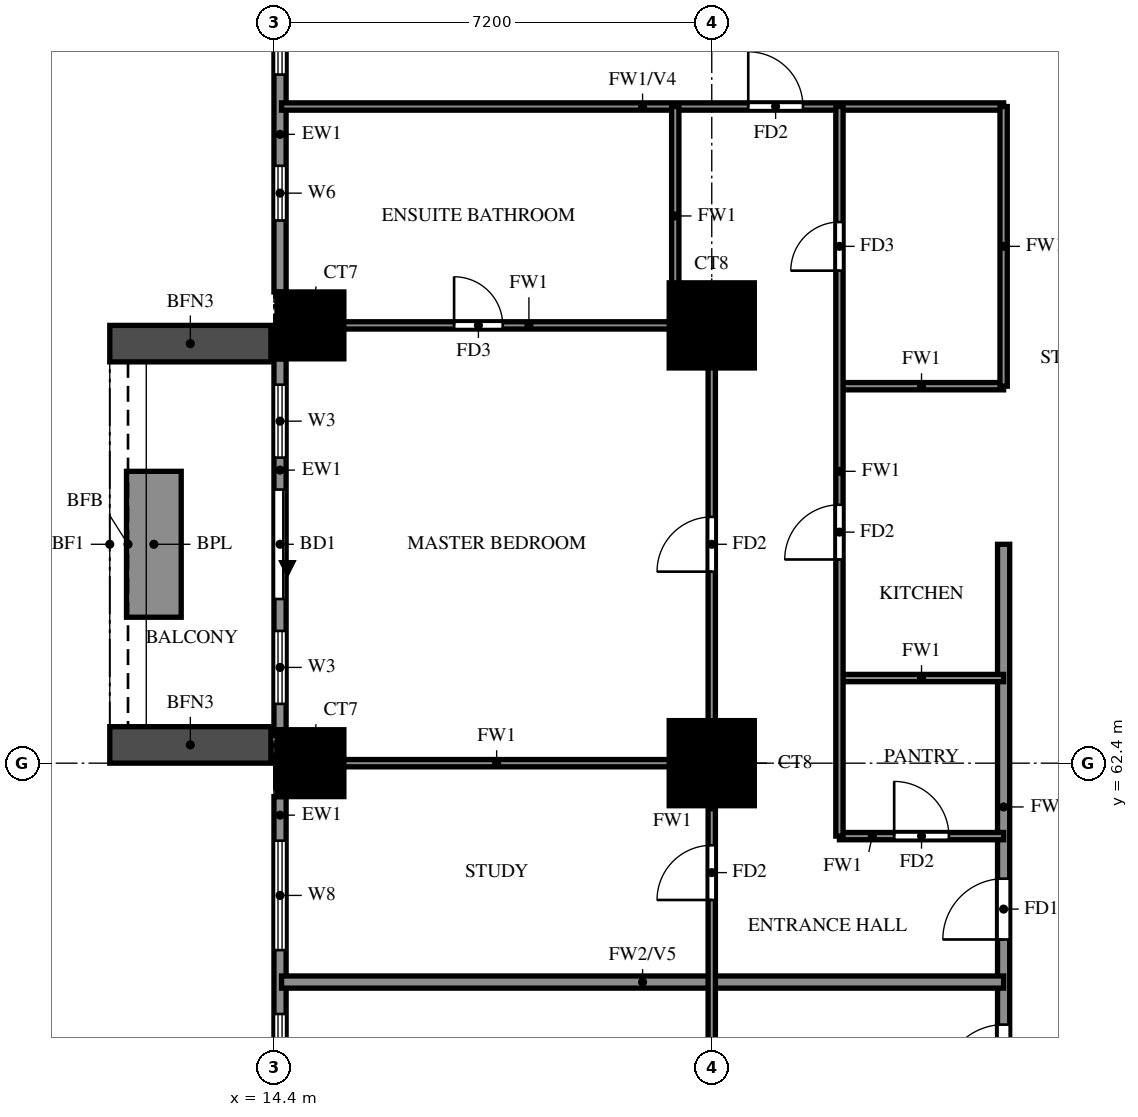
"""IFC4 building model, lengths in metres.
Left out: names, types, materials, properties, quantities, classifications, styles, units other than length and angle.
Written with IfcOpenShell. Run it as: python <this file> out.ifc"""

import sys

from ifc_helpers import new_model, si_unit, direction, frame, frame_2d, origin, origin_2d, place, context, subcontext, project, spatial, rectangle, extrude, source, transform, mapped, element, fill, save


model = new_model("IFC4")
c1 = context("Model", 3, precision=1e-05, world=origin(), true_north=direction((0.0, 1.0)))
c2 = subcontext(c1, "Body", "Model", "MODEL_VIEW")
j1 = project(units=[si_unit("LENGTHUNIT", "METRE"), si_unit("PLANEANGLEUNIT", "RADIAN")], contexts=[c1])
p1 = place(None, origin())
s1 = spatial("IfcSite", under=j1, at=p1, CompositionType="ELEMENT")
p2 = place(p1, origin())
s2 = spatial("IfcBuilding", under=s1, at=p2, CompositionType="ELEMENT")
p3 = place(p2, frame((0.0, 0.0, 58.5)))
s3 = spatial("IfcBuildingStorey", under=s2, at=p3, CompositionType="ELEMENT", Elevation=58.5)
m1 = source(origin(), c2, "Body", "SweptSolid", [
    extrude(rectangle(XDim=1.1, YDim=1.1, at=origin_2d()), origin(), (0.0, 0.0, 1.0), 3.18),
])
p4 = place(p3, frame((15.0, 62.4, 0.0), z_axis=(0.0, 0.0, 1.0), x_axis=(1.0, 0.0, 0.0)))
e1 = element("IfcColumn", 1, at=p4, inside=s3, PredefinedType="COLUMN", context=c2, shape_type="MappedRepresentation", body=[
    mapped(m1, transform((0.0, 0.0, 0.0))),
])
m2 = source(origin(), c2, "Body", "SweptSolid", [
    extrude(rectangle(XDim=1.4, YDim=1.4, at=origin_2d()), origin(), (0.0, 0.0, 1.0), 3.18),
])
p5 = place(p3, frame((21.6, 62.4, 0.0), z_axis=(0.0, 0.0, 1.0), x_axis=(1.0, 0.0, 0.0)))
e2 = element("IfcColumn", 2, at=p5, inside=s3, PredefinedType="COLUMN", context=c2, shape_type="MappedRepresentation", body=[
    mapped(m2, transform((0.0, 0.0, 0.0))),
])
p6 = place(p3, frame((15.0, 69.6, 0.0), z_axis=(0.0, 0.0, 1.0), x_axis=(1.0, 0.0, 0.0)))
e3 = element("IfcColumn", 3, at=p6, inside=s3, PredefinedType="COLUMN", context=c2, shape_type="MappedRepresentation", body=[
    mapped(m1, transform((0.0, 0.0, 0.0))),
])
p7 = place(p3, frame((21.6, 69.6, 0.0), z_axis=(0.0, 0.0, 1.0), x_axis=(1.0, 0.0, 0.0)))
e4 = element("IfcColumn", 4, at=p7, inside=s3, PredefinedType="COLUMN", context=c2, shape_type="MappedRepresentation", body=[
    mapped(m2, transform((0.0, 0.0, 0.0))),
])
p8 = place(p3, frame((14.5, 76.25, 0.0), z_axis=(0.0, 0.0, 1.0), x_axis=(0.0, -1.0, 0.0)))
e5 = element("IfcWall", 5, at=p8, inside=s3, PredefinedType="SOLIDWALL", context=c2, shape_type="SweptSolid", body=[
    extrude(rectangle(XDim=6.1, YDim=0.2, at=frame_2d((3.05, 0.0))), origin(), (0.0, 0.0, 1.0), 3.18),
])
p9 = place(p8, frame((4.025, 0.0, 1.5)))
e6 = element("IfcOpeningElement", 6, at=p9, cuts=e5, PredefinedType="OPENING", context=c2, shape_type="SweptSolid", body=[
    extrude(rectangle(XDim=0.9, YDim=0.9, at=frame_2d((0.45, 0.45))), frame((0.0, 0.11, 0.0), z_axis=(0.0, -1.0, 0.0), x_axis=(1.0, 0.0, 0.0)), (0.0, 0.0, 1.0), 0.22),
])
p10 = place(p8, frame((0.725, 0.0, 0.6)))
e7 = element("IfcOpeningElement", 7, at=p10, cuts=e5, PredefinedType="OPENING", context=c2, shape_type="SweptSolid", body=[
    extrude(rectangle(XDim=1.8, YDim=2.4, at=frame_2d((0.9, 1.2))), frame((0.0, 0.11, 0.0), z_axis=(0.0, -1.0, 0.0), x_axis=(1.0, 0.0, 0.0)), (0.0, 0.0, 1.0), 0.22),
])
p11 = place(p3, frame((14.5, 69.05, 0.0), z_axis=(0.0, 0.0, 1.0), x_axis=(0.0, -1.0, 0.0)))
e8 = element("IfcWall", 8, at=p11, inside=s3, PredefinedType="SOLIDWALL", context=c2, shape_type="SweptSolid", body=[
    extrude(rectangle(XDim=6.1, YDim=0.2, at=frame_2d((3.05, 0.0))), origin(), (0.0, 0.0, 1.0), 3.18),
])
p12 = place(p11, frame((2.15, 0.0, 0.0)))
e9 = element("IfcOpeningElement", 9, at=p12, cuts=e8, PredefinedType="OPENING", context=c2, shape_type="SweptSolid", body=[
    extrude(rectangle(XDim=1.8, YDim=2.4, at=frame_2d((0.9, 1.2))), frame((0.0, 0.11, 0.0), z_axis=(0.0, -1.0, 0.0), x_axis=(1.0, 0.0, 0.0)), (0.0, 0.0, 1.0), 0.22),
])
p13 = place(p11, frame((0.425, 0.0, 0.6)))
e10 = element("IfcOpeningElement", 10, at=p13, cuts=e8, PredefinedType="OPENING", context=c2, shape_type="SweptSolid", body=[
    extrude(rectangle(XDim=1.2, YDim=2.4, at=frame_2d((0.6, 1.2))), frame((0.0, 0.11, 0.0), z_axis=(0.0, -1.0, 0.0), x_axis=(1.0, 0.0, 0.0)), (0.0, 0.0, 1.0), 0.22),
])
p14 = place(p11, frame((4.475, 0.0, 0.6)))
e11 = element("IfcOpeningElement", 11, at=p14, cuts=e8, PredefinedType="OPENING", context=c2, shape_type="SweptSolid", body=[
    extrude(rectangle(XDim=1.2, YDim=2.4, at=frame_2d((0.6, 1.2))), frame((0.0, 0.11, 0.0), z_axis=(0.0, -1.0, 0.0), x_axis=(1.0, 0.0, 0.0)), (0.0, 0.0, 1.0), 0.22),
])
p15 = place(p3, frame((14.5, 61.85, 0.0), z_axis=(0.0, 0.0, 1.0), x_axis=(0.0, -1.0, 0.0)))
e12 = element("IfcWall", 12, at=p15, inside=s3, PredefinedType="SOLIDWALL", context=c2, shape_type="SweptSolid", body=[
    extrude(rectangle(XDim=6.1, YDim=0.2, at=frame_2d((3.05, 0.0))), origin(), (0.0, 0.0, 1.0), 3.18),
])
p16 = place(p15, frame((3.575, 0.0, 0.6)))
e13 = element("IfcOpeningElement", 13, at=p16, cuts=e12, PredefinedType="OPENING", context=c2, shape_type="SweptSolid", body=[
    extrude(rectangle(XDim=1.8, YDim=2.4, at=frame_2d((0.9, 1.2))), frame((0.0, 0.11, 0.0), z_axis=(0.0, -1.0, 0.0), x_axis=(1.0, 0.0, 0.0)), (0.0, 0.0, 1.0), 0.22),
])
p17 = place(p15, frame((0.725, 0.0, 0.6)))
e14 = element("IfcOpeningElement", 14, at=p17, cuts=e12, PredefinedType="OPENING", context=c2, shape_type="SweptSolid", body=[
    extrude(rectangle(XDim=1.8, YDim=2.4, at=frame_2d((0.9, 1.2))), frame((0.0, 0.11, 0.0), z_axis=(0.0, -1.0, 0.0), x_axis=(1.0, 0.0, 0.0)), (0.0, 0.0, 1.0), 0.22),
])
for number, where, z_axis, x_axis in (
    (15, (14.35, 69.3, 0.0), (0.0, 0.0, 1.0), (-1.0, 0.0, 0.0)),
    (16, (14.35, 62.7, 0.0), (0.0, 0.0, 1.0), (-1.0, 0.0, 0.0)),
):
    element("IfcWall", number, at=place(p3, frame(where, z_axis=z_axis, x_axis=x_axis)), inside=s3, PredefinedType="SOLIDWALL", context=c2, shape_type="SweptSolid", body=[
        extrude(rectangle(XDim=2.65, YDim=0.6, at=frame_2d((1.325, 0.0))), origin(), (0.0, 0.0, 1.0), 2.85),
    ])
p18 = place(p3, frame((12.425, 67.2, 0.0), z_axis=(0.0, 0.0, 1.0), x_axis=(0.0, -1.0, 0.0)))
e17 = element("IfcWall", 17, at=p18, inside=s3, PredefinedType="SOLIDWALL", context=c2, shape_type="SweptSolid", body=[
    extrude(rectangle(XDim=2.4, YDim=0.9, at=frame_2d((1.2, 0.0))), origin(), (0.0, 0.0, 1.0), 0.9),
])
p19 = place(p3, frame((26.4, 56.4, 0.0), z_axis=(0.0, 0.0, 1.0), x_axis=(0.0, 1.0, 0.0)))
e18 = element("IfcWall", 18, at=p19, inside=s3, PredefinedType="SOLIDWALL", context=c2, shape_type="SweptSolid", body=[
    extrude(rectangle(XDim=9.6, YDim=0.2, at=frame_2d((4.8, 0.0))), origin(), (0.0, 0.0, 1.0), 3.18),
])
p20 = place(p19, frame((0.7, 0.0, 0.0)))
e19 = element("IfcOpeningElement", 19, at=p20, cuts=e18, PredefinedType="OPENING", context=c2, shape_type="SweptSolid", body=[
    extrude(rectangle(XDim=1.0, YDim=2.1, at=frame_2d((0.5, 1.05))), frame((0.0, 0.11, 0.0), z_axis=(0.0, -1.0, 0.0), x_axis=(1.0, 0.0, 0.0)), (0.0, 0.0, 1.0), 0.22),
])
p21 = place(p19, frame((3.1, 0.0, 0.0)))
e20 = element("IfcOpeningElement", 20, at=p21, cuts=e18, PredefinedType="OPENING", context=c2, shape_type="SweptSolid", body=[
    extrude(rectangle(XDim=1.0, YDim=2.1, at=frame_2d((0.5, 1.05))), frame((0.0, 0.11, 0.0), z_axis=(0.0, -1.0, 0.0), x_axis=(1.0, 0.0, 0.0)), (0.0, 0.0, 1.0), 0.22),
])
p22 = place(p3, frame((14.525, 58.8, 0.0), z_axis=(0.0, 0.0, 1.0), x_axis=(1.0, 0.0, 0.0)))
e21 = element("IfcWall", 21, at=p22, inside=s3, PredefinedType="SOLIDWALL", context=c2, shape_type="SweptSolid", body=[
    extrude(rectangle(XDim=11.875, YDim=0.2, at=frame_2d((5.938, 0.0))), origin(), (0.0, 0.0, 1.0), 2.28),
])
p23 = place(p3, frame((23.7, 61.2, 0.0), z_axis=(0.0, 0.0, 1.0), x_axis=(1.0, 0.0, 0.0)))
e22 = element("IfcWall", 22, at=p23, inside=s3, PredefinedType="PARTITIONING", context=c2, shape_type="SweptSolid", body=[
    extrude(rectangle(XDim=2.7, YDim=0.12, at=frame_2d((1.35, 0.0))), origin(), (0.0, 0.0, 1.0), 3.18),
])
p24 = place(p23, frame((0.9, 0.0, 0.0)))
e23 = element("IfcOpeningElement", 23, at=p24, cuts=e22, PredefinedType="OPENING", context=c2, shape_type="SweptSolid", body=[
    extrude(rectangle(XDim=0.9, YDim=2.1, at=frame_2d((0.45, 1.05))), frame((0.0, 0.07, 0.0), z_axis=(0.0, -1.0, 0.0), x_axis=(1.0, 0.0, 0.0)), (0.0, 0.0, 1.0), 0.14),
])
p25 = place(p3, frame((14.525, 62.4, 0.0), z_axis=(0.0, 0.0, 1.0), x_axis=(1.0, 0.0, 0.0)))
e24 = element("IfcWall", 24, at=p25, inside=s3, PredefinedType="PARTITIONING", context=c2, shape_type="SweptSolid", body=[
    extrude(rectangle(XDim=7.075, YDim=0.12, at=frame_2d((3.538, 0.0))), origin(), (0.0, 0.0, 1.0), 3.18),
])
for number, where, z_axis, x_axis in (
    (25, (23.7, 63.8, 0.0), (0.0, 0.0, 1.0), (1.0, 0.0, 0.0)),
    (26, (23.7, 68.6, 0.0), (0.0, 0.0, 1.0), (1.0, 0.0, 0.0)),
):
    element("IfcWall", number, at=place(p3, frame(where, z_axis=z_axis, x_axis=x_axis)), inside=s3, PredefinedType="PARTITIONING", context=c2, shape_type="SweptSolid", body=[
        extrude(rectangle(XDim=2.7, YDim=0.12, at=frame_2d((1.35, 0.0))), origin(), (0.0, 0.0, 1.0), 3.18),
    ])
p26 = place(p3, frame((14.525, 69.6, 0.0), z_axis=(0.0, 0.0, 1.0), x_axis=(1.0, 0.0, 0.0)))
e27 = element("IfcWall", 27, at=p26, inside=s3, PredefinedType="PARTITIONING", context=c2, shape_type="SweptSolid", body=[
    extrude(rectangle(XDim=7.075, YDim=0.12, at=frame_2d((3.538, 0.0))), origin(), (0.0, 0.0, 1.0), 3.18),
])
p27 = place(p26, frame((2.837, 0.0, 0.0)))
e28 = element("IfcOpeningElement", 28, at=p27, cuts=e27, PredefinedType="OPENING", context=c2, shape_type="SweptSolid", body=[
    extrude(rectangle(XDim=0.8, YDim=2.1, at=frame_2d((0.4, 1.05))), frame((0.0, 0.07, 0.0), z_axis=(0.0, -1.0, 0.0), x_axis=(1.0, 0.0, 0.0)), (0.0, 0.0, 1.0), 0.14),
])
p28 = place(p3, frame((14.525, 73.2, 0.0), z_axis=(0.0, 0.0, 1.0), x_axis=(1.0, 0.0, 0.0)))
e29 = element("IfcWall", 29, at=p28, inside=s3, PredefinedType="PARTITIONING", context=c2, shape_type="SweptSolid", body=[
    extrude(rectangle(XDim=11.875, YDim=0.12, at=frame_2d((5.938, 0.0))), origin(), (0.0, 0.0, 1.0), 2.28),
])
p29 = place(p28, frame((7.675, 0.0, 0.0)))
e30 = element("IfcOpeningElement", 30, at=p29, cuts=e29, PredefinedType="OPENING", context=c2, shape_type="SweptSolid", body=[
    extrude(rectangle(XDim=0.9, YDim=2.1, at=frame_2d((0.45, 1.05))), frame((0.0, 0.07, 0.0), z_axis=(0.0, -1.0, 0.0), x_axis=(1.0, 0.0, 0.0)), (0.0, 0.0, 1.0), 0.14),
])
p30 = place(p3, frame((21.0, 69.6, 0.0), z_axis=(0.0, 0.0, 1.0), x_axis=(0.0, 1.0, 0.0)))
e31 = element("IfcWall", 31, at=p30, inside=s3, PredefinedType="PARTITIONING", context=c2, shape_type="SweptSolid", body=[
    extrude(rectangle(XDim=3.6, YDim=0.12, at=frame_2d((1.8, 0.0))), origin(), (0.0, 0.0, 1.0), 3.18),
])
p31 = place(p3, frame((21.6, 55.2, 0.0), z_axis=(0.0, 0.0, 1.0), x_axis=(0.0, 1.0, 0.0)))
e32 = element("IfcWall", 32, at=p31, inside=s3, PredefinedType="PARTITIONING", context=c2, shape_type="SweptSolid", body=[
    extrude(rectangle(XDim=14.4, YDim=0.12, at=frame_2d((7.2, 0.0))), origin(), (0.0, 0.0, 1.0), 3.18),
])
p32 = place(p31, frame((1.05, 0.0, 0.0)))
e33 = element("IfcOpeningElement", 33, at=p32, cuts=e32, PredefinedType="OPENING", context=c2, shape_type="SweptSolid", body=[
    extrude(rectangle(XDim=1.5, YDim=2.1, at=frame_2d((0.75, 1.05))), frame((0.0, 0.07, 0.0), z_axis=(0.0, -1.0, 0.0), x_axis=(1.0, 0.0, 0.0)), (0.0, 0.0, 1.0), 0.14),
])
p33 = place(p31, frame((4.95, 0.0, 0.0)))
e34 = element("IfcOpeningElement", 34, at=p33, cuts=e32, PredefinedType="OPENING", context=c2, shape_type="SweptSolid", body=[
    extrude(rectangle(XDim=0.9, YDim=2.1, at=frame_2d((0.45, 1.05))), frame((0.0, 0.07, 0.0), z_axis=(0.0, -1.0, 0.0), x_axis=(1.0, 0.0, 0.0)), (0.0, 0.0, 1.0), 0.14),
])
p34 = place(p31, frame((10.35, 0.0, 0.0)))
e35 = element("IfcOpeningElement", 35, at=p34, cuts=e32, PredefinedType="OPENING", context=c2, shape_type="SweptSolid", body=[
    extrude(rectangle(XDim=0.9, YDim=2.1, at=frame_2d((0.45, 1.05))), frame((0.0, 0.07, 0.0), z_axis=(0.0, -1.0, 0.0), x_axis=(1.0, 0.0, 0.0)), (0.0, 0.0, 1.0), 0.14),
])
p35 = place(p3, frame((23.7, 61.2, 0.0), z_axis=(0.0, 0.0, 1.0), x_axis=(0.0, 1.0, 0.0)))
e36 = element("IfcWall", 36, at=p35, inside=s3, PredefinedType="PARTITIONING", context=c2, shape_type="SweptSolid", body=[
    extrude(rectangle(XDim=12.0, YDim=0.12, at=frame_2d((6.0, 0.0))), origin(), (0.0, 0.0, 1.0), 3.18),
])
p36 = place(p35, frame((4.55, 0.0, 0.0)))
e37 = element("IfcOpeningElement", 37, at=p36, cuts=e36, PredefinedType="OPENING", context=c2, shape_type="SweptSolid", body=[
    extrude(rectangle(XDim=0.9, YDim=2.1, at=frame_2d((0.45, 1.05))), frame((0.0, 0.07, 0.0), z_axis=(0.0, -1.0, 0.0), x_axis=(1.0, 0.0, 0.0)), (0.0, 0.0, 1.0), 0.14),
])
p37 = place(p35, frame((9.3, 0.0, 0.0)))
e38 = element("IfcOpeningElement", 38, at=p37, cuts=e36, PredefinedType="OPENING", context=c2, shape_type="SweptSolid", body=[
    extrude(rectangle(XDim=0.8, YDim=2.1, at=frame_2d((0.4, 1.05))), frame((0.0, 0.07, 0.0), z_axis=(0.0, -1.0, 0.0), x_axis=(1.0, 0.0, 0.0)), (0.0, 0.0, 1.0), 0.14),
])
p38 = place(p3, frame((26.4, 68.6, 0.0), z_axis=(0.0, 0.0, 1.0), x_axis=(0.0, 1.0, 0.0)))
e39 = element("IfcWall", 39, at=p38, inside=s3, PredefinedType="PARTITIONING", context=c2, shape_type="SweptSolid", body=[
    extrude(rectangle(XDim=4.6, YDim=0.12, at=frame_2d((2.3, 0.0))), origin(), (0.0, 0.0, 1.0), 3.18),
])
p39 = place(p9, origin())
e40 = element("IfcWindow", 40, at=p39, inside=s3, PartitioningType="SINGLE_PANEL", PredefinedType="WINDOW", context=c2, shape_type="SweptSolid", body=[
    extrude(rectangle(XDim=0.9, YDim=0.9, at=frame_2d((0.45, 0.45))), frame((0.0, 0.03, 0.0), z_axis=(0.0, -1.0, 0.0), x_axis=(1.0, 0.0, 0.0)), (0.0, 0.0, 1.0), 0.06),
])
fill(e6, e40)
p40 = place(p10, origin())
e41 = element("IfcWindow", 41, at=p40, inside=s3, PartitioningType="DOUBLE_PANEL_VERTICAL", PredefinedType="WINDOW", context=c2, shape_type="SweptSolid", body=[
    extrude(rectangle(XDim=1.8, YDim=2.4, at=frame_2d((0.9, 1.2))), frame((0.0, 0.03, 0.0), z_axis=(0.0, -1.0, 0.0), x_axis=(1.0, 0.0, 0.0)), (0.0, 0.0, 1.0), 0.06),
])
fill(e7, e41)
p41 = place(p12, origin())
e42 = element("IfcDoor", 42, at=p41, inside=s3, OperationType="DOUBLE_DOOR_SLIDING", PredefinedType="DOOR", context=c2, shape_type="SweptSolid", body=[
    extrude(rectangle(XDim=1.8, YDim=2.4, at=frame_2d((0.9, 1.2))), frame((0.0, 0.025, 0.0), z_axis=(0.0, -1.0, 0.0), x_axis=(1.0, 0.0, 0.0)), (0.0, 0.0, 1.0), 0.05),
])
fill(e9, e42)
p42 = place(p13, origin())
e43 = element("IfcWindow", 43, at=p42, inside=s3, PartitioningType="SINGLE_PANEL", PredefinedType="WINDOW", context=c2, shape_type="SweptSolid", body=[
    extrude(rectangle(XDim=1.2, YDim=2.4, at=frame_2d((0.6, 1.2))), frame((0.0, 0.03, 0.0), z_axis=(0.0, -1.0, 0.0), x_axis=(1.0, 0.0, 0.0)), (0.0, 0.0, 1.0), 0.06),
])
fill(e10, e43)
p43 = place(p14, origin())
e44 = element("IfcWindow", 44, at=p43, inside=s3, PartitioningType="SINGLE_PANEL", PredefinedType="WINDOW", context=c2, shape_type="SweptSolid", body=[
    extrude(rectangle(XDim=1.2, YDim=2.4, at=frame_2d((0.6, 1.2))), frame((0.0, 0.03, 0.0), z_axis=(0.0, -1.0, 0.0), x_axis=(1.0, 0.0, 0.0)), (0.0, 0.0, 1.0), 0.06),
])
fill(e11, e44)
p44 = place(p16, origin())
e45 = element("IfcWindow", 45, at=p44, inside=s3, PartitioningType="DOUBLE_PANEL_VERTICAL", PredefinedType="WINDOW", context=c2, shape_type="SweptSolid", body=[
    extrude(rectangle(XDim=1.8, YDim=2.4, at=frame_2d((0.9, 1.2))), frame((0.0, 0.03, 0.0), z_axis=(0.0, -1.0, 0.0), x_axis=(1.0, 0.0, 0.0)), (0.0, 0.0, 1.0), 0.06),
])
fill(e13, e45)
p45 = place(p17, origin())
e46 = element("IfcWindow", 46, at=p45, inside=s3, PartitioningType="DOUBLE_PANEL_VERTICAL", PredefinedType="WINDOW", context=c2, shape_type="SweptSolid", body=[
    extrude(rectangle(XDim=1.8, YDim=2.4, at=frame_2d((0.9, 1.2))), frame((0.0, 0.03, 0.0), z_axis=(0.0, -1.0, 0.0), x_axis=(1.0, 0.0, 0.0)), (0.0, 0.0, 1.0), 0.06),
])
fill(e14, e46)
p46 = place(p20, origin())
e47 = element("IfcDoor", 47, at=p46, inside=s3, OperationType="SINGLE_SWING_RIGHT", PredefinedType="DOOR", context=c2, shape_type="SweptSolid", body=[
    extrude(rectangle(XDim=1.0, YDim=2.1, at=frame_2d((0.5, 1.05))), frame((0.0, 0.025, 0.0), z_axis=(0.0, -1.0, 0.0), x_axis=(1.0, 0.0, 0.0)), (0.0, 0.0, 1.0), 0.05),
])
fill(e19, e47)
p47 = place(p21, origin())
e48 = element("IfcDoor", 48, at=p47, inside=s3, OperationType="SINGLE_SWING_LEFT", PredefinedType="DOOR", context=c2, shape_type="SweptSolid", body=[
    extrude(rectangle(XDim=1.0, YDim=2.1, at=frame_2d((0.5, 1.05))), frame((0.0, 0.025, 0.0), z_axis=(0.0, -1.0, 0.0), x_axis=(1.0, 0.0, 0.0)), (0.0, 0.0, 1.0), 0.05),
])
fill(e20, e48)
p48 = place(p33, origin())
e49 = element("IfcDoor", 49, at=p48, inside=s3, OperationType="SINGLE_SWING_RIGHT", PredefinedType="DOOR", context=c2, shape_type="SweptSolid", body=[
    extrude(rectangle(XDim=0.9, YDim=2.1, at=frame_2d((0.45, 1.05))), frame((0.0, 0.025, 0.0), z_axis=(0.0, -1.0, 0.0), x_axis=(1.0, 0.0, 0.0)), (0.0, 0.0, 1.0), 0.05),
])
fill(e34, e49)
p49 = place(p34, origin())
e50 = element("IfcDoor", 50, at=p49, inside=s3, OperationType="SINGLE_SWING_LEFT", PredefinedType="DOOR", context=c2, shape_type="SweptSolid", body=[
    extrude(rectangle(XDim=0.9, YDim=2.1, at=frame_2d((0.45, 1.05))), frame((0.0, 0.025, 0.0), z_axis=(0.0, -1.0, 0.0), x_axis=(1.0, 0.0, 0.0)), (0.0, 0.0, 1.0), 0.05),
])
fill(e35, e50)
p50 = place(p27, origin())
e51 = element("IfcDoor", 51, at=p50, inside=s3, OperationType="SINGLE_SWING_LEFT", PredefinedType="DOOR", context=c2, shape_type="SweptSolid", body=[
    extrude(rectangle(XDim=0.8, YDim=2.1, at=frame_2d((0.4, 1.05))), frame((0.0, 0.025, 0.0), z_axis=(0.0, -1.0, 0.0), x_axis=(1.0, 0.0, 0.0)), (0.0, 0.0, 1.0), 0.05),
])
fill(e28, e51)
p51 = place(p29, origin())
e52 = element("IfcDoor", 52, at=p51, inside=s3, OperationType="SINGLE_SWING_RIGHT", PredefinedType="DOOR", context=c2, shape_type="SweptSolid", body=[
    extrude(rectangle(XDim=0.9, YDim=2.1, at=frame_2d((0.45, 1.05))), frame((0.0, 0.025, 0.0), z_axis=(0.0, -1.0, 0.0), x_axis=(1.0, 0.0, 0.0)), (0.0, 0.0, 1.0), 0.05),
])
fill(e30, e52)
p52 = place(p24, origin())
e53 = element("IfcDoor", 53, at=p52, inside=s3, OperationType="SINGLE_SWING_LEFT", PredefinedType="DOOR", context=c2, shape_type="SweptSolid", body=[
    extrude(rectangle(XDim=0.9, YDim=2.1, at=frame_2d((0.45, 1.05))), frame((0.0, 0.025, 0.0), z_axis=(0.0, -1.0, 0.0), x_axis=(1.0, 0.0, 0.0)), (0.0, 0.0, 1.0), 0.05),
])
fill(e23, e53)
p53 = place(p36, origin())
e54 = element("IfcDoor", 54, at=p53, inside=s3, OperationType="SINGLE_SWING_LEFT", PredefinedType="DOOR", context=c2, shape_type="SweptSolid", body=[
    extrude(rectangle(XDim=0.9, YDim=2.1, at=frame_2d((0.45, 1.05))), frame((0.0, 0.025, 0.0), z_axis=(0.0, -1.0, 0.0), x_axis=(1.0, 0.0, 0.0)), (0.0, 0.0, 1.0), 0.05),
])
fill(e37, e54)
p54 = place(p37, origin())
e55 = element("IfcDoor", 55, at=p54, inside=s3, OperationType="SINGLE_SWING_RIGHT", PredefinedType="DOOR", context=c2, shape_type="SweptSolid", body=[
    extrude(rectangle(XDim=0.8, YDim=2.1, at=frame_2d((0.4, 1.05))), frame((0.0, 0.025, 0.0), z_axis=(0.0, -1.0, 0.0), x_axis=(1.0, 0.0, 0.0)), (0.0, 0.0, 1.0), 0.05),
])
fill(e38, e55)
save(model, sys.argv[1])
